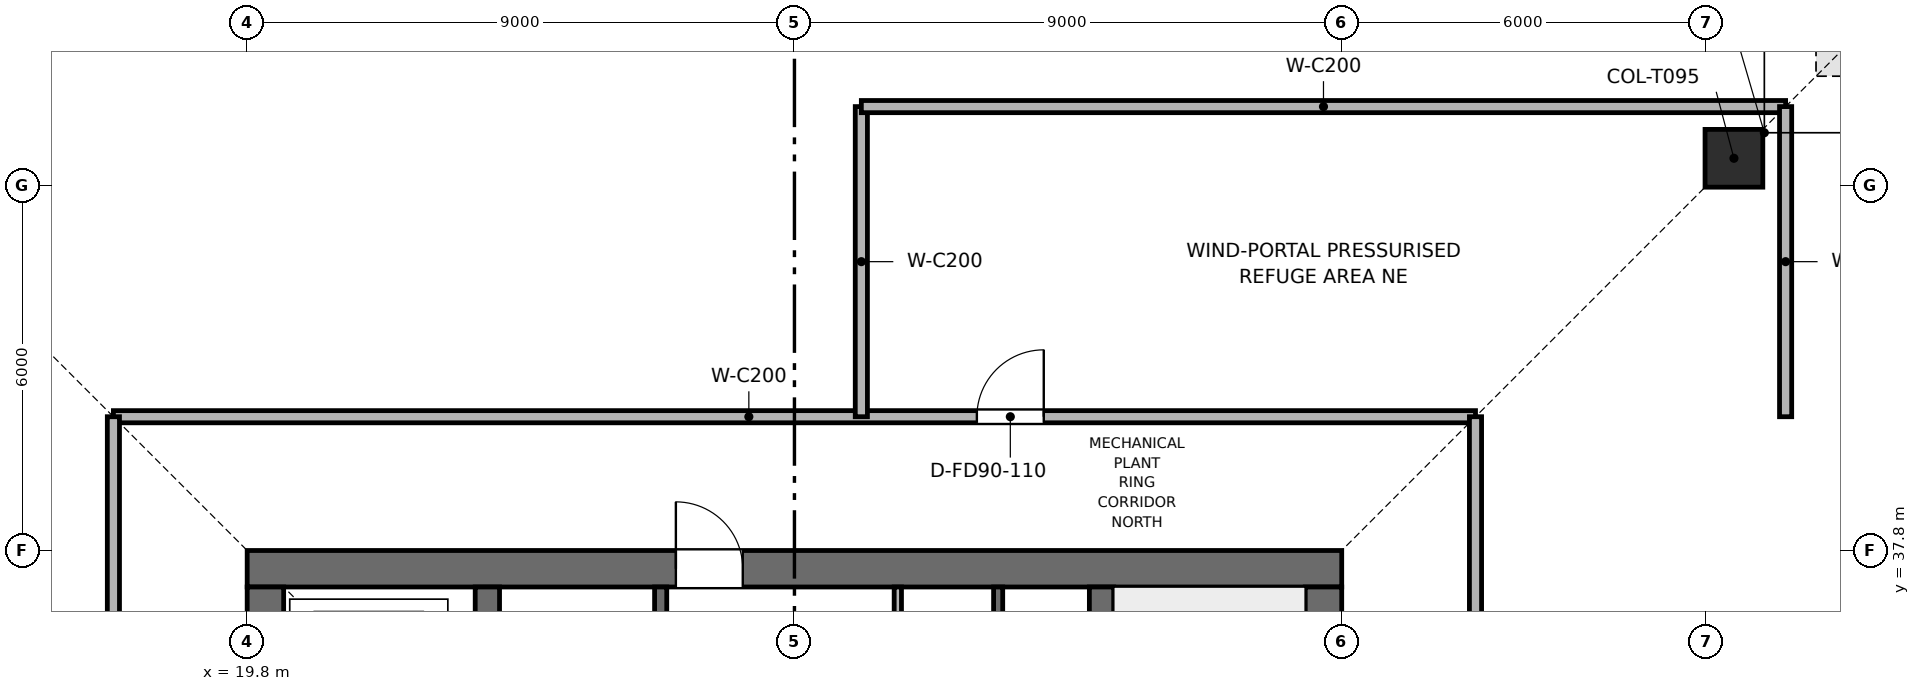
"""IFC4 building model, lengths in metres.
Left out: names, types, materials, properties, quantities, classifications, styles, units other than length and angle.
Written with IfcOpenShell. Run it as: python <this file> out.ifc"""

import sys

from ifc_helpers import new_model, si_unit, direction, frame, frame_2d, origin, origin_2d, place, context, subcontext, project, spatial, rectangle, extrude, element, fill, save


model = new_model("IFC4")
c1 = context("Model", 3, precision=1e-05, world=origin(), true_north=direction((0.0, 1.0)))
c2 = subcontext(c1, "Body", "Model", "MODEL_VIEW")
j1 = project(units=[si_unit("LENGTHUNIT", "METRE"), si_unit("PLANEANGLEUNIT", "RADIAN")], contexts=[c1])
p1 = place(None, origin())
s1 = spatial("IfcSite", under=j1, at=p1, CompositionType="ELEMENT")
p2 = place(p1, origin())
s2 = spatial("IfcBuilding", under=s1, at=p2, CompositionType="ELEMENT")
p3 = place(p2, frame((0.0, 0.0, 289.5)))
s3 = spatial("IfcBuildingStorey", under=s2, at=p3, CompositionType="ELEMENT", Elevation=289.5)
p4 = place(p3, frame((19.8, 37.5, 0.0), z_axis=(0.0, 0.0, 1.0), x_axis=(1.0, 0.0, 0.0)))
e1 = element("IfcWall", 1, at=p4, inside=s3, PredefinedType="SHEAR", context=c2, shape_type="SweptSolid", body=[
    extrude(rectangle(XDim=18.0, YDim=0.6, at=frame_2d((9.0, 0.0))), origin(), (0.0, 0.0, 1.0), 6.0),
])
p5 = place(p4, frame((7.05, 0.0, 0.0)))
e2 = element("IfcOpeningElement", 2, at=p5, cuts=e1, PredefinedType="OPENING", context=c2, shape_type="SweptSolid", body=[
    extrude(rectangle(XDim=1.1, YDim=2.15, at=frame_2d((0.55, 1.075))), frame((0.0, 0.31, 0.0), z_axis=(0.0, -1.0, 0.0), x_axis=(1.0, 0.0, 0.0)), (0.0, 0.0, 1.0), 0.62),
])
p6 = place(p3, frame((20.1, 20.4, 0.0), z_axis=(0.0, 0.0, 1.0), x_axis=(0.0, 1.0, 0.0)))
e3 = element("IfcWall", 3, at=p6, inside=s3, PredefinedType="SHEAR", context=c2, shape_type="SweptSolid", body=[
    extrude(rectangle(XDim=16.8, YDim=0.6, at=frame_2d((8.4, 0.0))), origin(), (0.0, 0.0, 1.0), 6.0),
])
p7 = place(p6, frame((10.4, 0.0, 0.0)))
e4 = element("IfcOpeningElement", 4, at=p7, cuts=e3, PredefinedType="OPENING", context=c2, shape_type="SweptSolid", body=[
    extrude(rectangle(XDim=1.1, YDim=2.15, at=frame_2d((0.55, 1.075))), frame((0.0, 0.31, 0.0), z_axis=(0.0, -1.0, 0.0), x_axis=(1.0, 0.0, 0.0)), (0.0, 0.0, 1.0), 0.62),
])
p8 = place(p3, frame((37.5, 20.4, 0.0), z_axis=(0.0, 0.0, 1.0), x_axis=(0.0, 1.0, 0.0)))
e5 = element("IfcWall", 5, at=p8, inside=s3, PredefinedType="SHEAR", context=c2, shape_type="SweptSolid", body=[
    extrude(rectangle(XDim=16.8, YDim=0.6, at=frame_2d((8.4, 0.0))), origin(), (0.0, 0.0, 1.0), 6.0),
])
p9 = place(p8, frame((4.9, 0.0, 0.0)))
e6 = element("IfcOpeningElement", 6, at=p9, cuts=e5, PredefinedType="OPENING", context=c2, shape_type="SweptSolid", body=[
    extrude(rectangle(XDim=1.1, YDim=2.15, at=frame_2d((0.55, 1.075))), frame((0.0, 0.31, 0.0), z_axis=(0.0, -1.0, 0.0), x_axis=(1.0, 0.0, 0.0)), (0.0, 0.0, 1.0), 0.62),
])
for number, where, z_axis, x_axis in (
    (7, (23.75, 20.4, 0.0), (0.0, 0.0, 1.0), (0.0, 1.0, 0.0)),
    (8, (33.85, 20.4, 0.0), (0.0, 0.0, 1.0), (0.0, 1.0, 0.0)),
):
    element("IfcWall", number, at=place(p3, frame(where, z_axis=z_axis, x_axis=x_axis)), inside=s3, PredefinedType="SHEAR", context=c2, shape_type="SweptSolid", body=[
        extrude(rectangle(XDim=16.8, YDim=0.4, at=frame_2d((8.4, 0.0))), origin(), (0.0, 0.0, 1.0), 6.0),
    ])
p10 = place(p3, frame((44.25, 44.25, 0.003), z_axis=(-0.049940740348, -0.049940740348, 0.997502804461), x_axis=(0.707106781187, -0.707106781187, 0.0)))
e9 = element("IfcColumn", 9, at=p10, inside=s3, PredefinedType="COLUMN", context=c2, shape_type="SweptSolid", body=[
    extrude(rectangle(XDim=0.95, YDim=0.95, at=origin_2d()), origin(), (0.0, 0.0, 1.0), 5.769),
])
p11 = place(p3, frame((32.15, 34.0, 0.0), z_axis=(0.0, 0.0, 1.0), x_axis=(0.0, 1.0, 0.0)))
e10 = element("IfcWall", 10, at=p11, inside=s3, PredefinedType="SHEAR", context=c2, shape_type="SweptSolid", body=[
    extrude(rectangle(XDim=3.2, YDim=0.15, at=frame_2d((1.6, 0.0))), origin(), (0.0, 0.0, 1.0), 5.76),
])
p12 = place(p3, frame((26.6, 34.0, 0.0), z_axis=(0.0, 0.0, 1.0), x_axis=(0.0, 1.0, 0.0)))
e11 = element("IfcWall", 11, at=p12, inside=s3, PredefinedType="SHEAR", context=c2, shape_type="SweptSolid", body=[
    extrude(rectangle(XDim=3.2, YDim=0.2, at=frame_2d((1.6, 0.0))), origin(), (0.0, 0.0, 1.0), 5.76),
])
p13 = place(p12, frame((0.75, 0.0, 0.0)))
e12 = element("IfcOpeningElement", 12, at=p13, cuts=e11, PredefinedType="OPENING", context=c2, shape_type="SweptSolid", body=[
    extrude(rectangle(XDim=1.1, YDim=2.15, at=frame_2d((0.55, 1.075))), frame((0.0, 0.11, 0.0), z_axis=(0.0, -1.0, 0.0), x_axis=(1.0, 0.0, 0.0)), (0.0, 0.0, 1.0), 0.22),
])
p14 = place(p3, frame((30.5, 33.925, 0.0), z_axis=(0.0, 0.0, 1.0), x_axis=(0.0, 1.0, 0.0)))
e13 = element("IfcWall", 13, at=p14, inside=s3, PredefinedType="PARTITIONING", context=c2, shape_type="SweptSolid", body=[
    extrude(rectangle(XDim=3.275, YDim=0.12, at=frame_2d((1.637, 0.0))), origin(), (0.0, 0.0, 1.0), 5.76),
])
p15 = place(p14, frame((0.85, 0.0, 0.0)))
e14 = element("IfcOpeningElement", 14, at=p15, cuts=e13, PredefinedType="OPENING", context=c2, shape_type="SweptSolid", body=[
    extrude(rectangle(XDim=0.9, YDim=2.1, at=frame_2d((0.45, 1.05))), frame((0.0, 0.07, 0.0), z_axis=(0.0, -1.0, 0.0), x_axis=(1.0, 0.0, 0.0)), (0.0, 0.0, 1.0), 0.14),
])
p16 = place(p3, frame((17.6, 40.0, 0.0), z_axis=(0.0, 0.0, 1.0), x_axis=(1.0, 0.0, 0.0)))
e15 = element("IfcWall", 15, at=p16, inside=s3, PredefinedType="PARTITIONING", context=c2, shape_type="SweptSolid", body=[
    extrude(rectangle(XDim=22.4, YDim=0.2, at=frame_2d((11.2, 0.0))), origin(), (0.0, 0.0, 1.0), 5.345),
])
p17 = place(p16, frame((14.2, 0.0, 0.0)))
e16 = element("IfcOpeningElement", 16, at=p17, cuts=e15, PredefinedType="OPENING", context=c2, shape_type="SweptSolid", body=[
    extrude(rectangle(XDim=1.1, YDim=2.15, at=frame_2d((0.55, 1.075))), frame((0.0, 0.11, 0.0), z_axis=(0.0, -1.0, 0.0), x_axis=(1.0, 0.0, 0.0)), (0.0, 0.0, 1.0), 0.22),
])
for number, where, z_axis, x_axis in (
    (17, (17.6, 17.6, 0.0), (0.0, 0.0, 1.0), (0.0, 1.0, 0.0)),
    (18, (40.0, 17.6, 0.0), (0.0, 0.0, 1.0), (0.0, 1.0, 0.0)),
):
    element("IfcWall", number, at=place(p3, frame(where, z_axis=z_axis, x_axis=x_axis)), inside=s3, PredefinedType="PARTITIONING", context=c2, shape_type="SweptSolid", body=[
        extrude(rectangle(XDim=22.4, YDim=0.2, at=frame_2d((11.2, 0.0))), origin(), (0.0, 0.0, 1.0), 5.345),
    ])
p18 = place(p3, frame((29.9, 40.0, 0.0), z_axis=(0.0, 0.0, 1.0), x_axis=(0.0, 1.0, 0.0)))
e19 = element("IfcWall", 19, at=p18, inside=s3, PredefinedType="PARTITIONING", context=c2, shape_type="SweptSolid", body=[
    extrude(rectangle(XDim=5.1, YDim=0.2, at=frame_2d((2.55, 0.0))), origin(), (0.0, 0.0, 1.0), 5.385),
])
p19 = place(p3, frame((29.9, 45.1, 0.0), z_axis=(0.0, 0.0, 1.0), x_axis=(1.0, 0.0, 0.0)))
e20 = element("IfcWall", 20, at=p19, inside=s3, PredefinedType="PARTITIONING", context=c2, shape_type="SweptSolid", body=[
    extrude(rectangle(XDim=15.2, YDim=0.2, at=frame_2d((7.6, 0.0))), origin(), (0.0, 0.0, 1.0), 5.345),
])
p20 = place(p3, frame((45.1, 40.0, 0.0), z_axis=(0.0, 0.0, 1.0), x_axis=(0.0, 1.0, 0.0)))
e21 = element("IfcWall", 21, at=p20, inside=s3, PredefinedType="PARTITIONING", context=c2, shape_type="SweptSolid", body=[
    extrude(rectangle(XDim=5.1, YDim=0.2, at=frame_2d((2.55, 0.0))), origin(), (0.0, 0.0, 1.0), 5.445),
])
p21 = place(p17, origin())
e22 = element("IfcDoor", 22, at=p21, inside=s3, OperationType="SINGLE_SWING_RIGHT", PredefinedType="DOOR", context=c2, shape_type="SweptSolid", body=[
    extrude(rectangle(XDim=1.1, YDim=2.15, at=frame_2d((0.55, 1.075))), frame((0.0, 0.025, 0.0), z_axis=(0.0, -1.0, 0.0), x_axis=(1.0, 0.0, 0.0)), (0.0, 0.0, 1.0), 0.05),
])
fill(e16, e22)
p22 = place(p5, origin())
e23 = element("IfcDoor", 23, at=p22, inside=s3, OperationType="SINGLE_SWING_LEFT", PredefinedType="DOOR", context=c2, shape_type="SweptSolid", body=[
    extrude(rectangle(XDim=1.1, YDim=2.15, at=frame_2d((0.55, 1.075))), frame((0.0, 0.025, 0.0), z_axis=(0.0, -1.0, 0.0), x_axis=(1.0, 0.0, 0.0)), (0.0, 0.0, 1.0), 0.05),
])
fill(e2, e23)
save(model, sys.argv[1])
